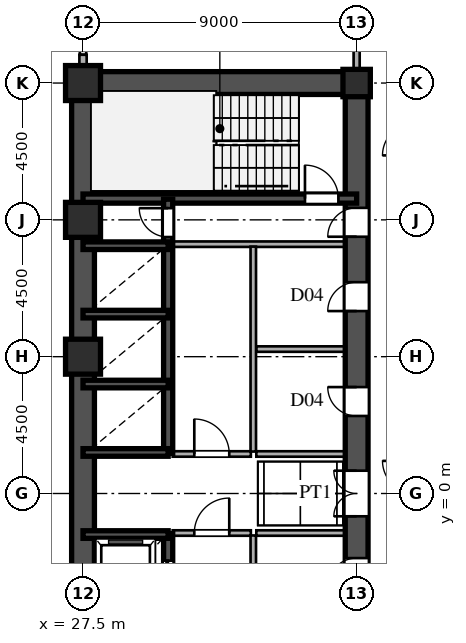
"""IFC4 building model, lengths in metres.
Left out: names, types, materials, properties, quantities, classifications, styles, units other than length and angle.
Written with IfcOpenShell. Run it as: python <this file> out.ifc"""

import sys

from ifc_helpers import new_model, si_unit, direction, frame, frame_2d, origin, origin_2d, place, context, subcontext, project, spatial, rectangle, hollow_rectangle, i_section, extrude, source, transform, mapped, element, fill, save


model = new_model("IFC4")
c1 = context("Model", 3, precision=1e-05, world=origin(), true_north=direction((0.0, 1.0)))
c2 = subcontext(c1, "Body", "Model", "MODEL_VIEW")
j1 = project(units=[si_unit("LENGTHUNIT", "METRE"), si_unit("PLANEANGLEUNIT", "RADIAN")], contexts=[c1])
p1 = place(None, origin())
s1 = spatial("IfcSite", under=j1, at=p1, CompositionType="ELEMENT")
p2 = place(p1, origin())
s2 = spatial("IfcBuilding", under=s1, at=p2, CompositionType="ELEMENT")
p3 = place(p2, frame((0.0, 0.0, 29.7)))
s3 = spatial("IfcBuildingStorey", under=s2, at=p3, CompositionType="ELEMENT", Elevation=29.7)
m1 = source(origin(), c2, "Body", "SweptSolid", [
    extrude(hollow_rectangle(XDim=1.15, YDim=1.15, WallThickness=0.048, at=origin_2d()), origin(), (0.0, 0.0, 1.0), 3.6),
])
for number, where, z_axis, x_axis in (
    (1, (27.5, 4.5, 0.0), (0.0, 0.0, 1.0), (1.0, 0.0, 0.0)),
    (2, (27.5, 9.0, 0.0), (0.0, 0.0, 1.0), (1.0, 0.0, 0.0)),
    (3, (27.5, 13.5, 0.0), (0.0, 0.0, 1.0), (1.0, 0.0, 0.0)),
):
    element("IfcColumn", number, at=place(p3, frame(where, z_axis=z_axis, x_axis=x_axis)), inside=s3, PredefinedType="COLUMN", context=c2, shape_type="MappedRepresentation", body=[
        mapped(m1, transform((0.0, 0.0, 0.0), scale=1.0)),
    ])
m2 = source(origin(), c2, "Body", "SweptSolid", [
    extrude(i_section(OverallWidth=0.9, OverallDepth=0.9, WebThickness=0.036, FlangeThickness=0.055, at=origin_2d()), origin(), (0.0, 0.0, 1.0), 3.6),
])
p4 = place(p3, frame((36.5, 13.5, 0.0), z_axis=(0.0, 0.0, 1.0), x_axis=(1.0, 0.0, 0.0)))
e4 = element("IfcColumn", 4, at=p4, inside=s3, PredefinedType="COLUMN", context=c2, shape_type="MappedRepresentation", body=[
    mapped(m2, transform((0.0, 0.0, 0.0), scale=1.0)),
])
p5 = place(p3, frame((27.5, 13.88, 0.0), z_axis=(0.0, 0.0, 1.0), x_axis=(0.0, 1.0, 0.0)))
e5 = element("IfcWall", 5, at=p5, inside=s3, PredefinedType="SOLIDWALL", context=c2, shape_type="SweptSolid", body=[
    extrude(rectangle(XDim=0.55, YDim=0.24, at=frame_2d((0.275, 0.0))), origin(), (0.0, 0.0, 1.0), 2.88),
])
for number, where, z_axis, x_axis in (
    (6, (27.5, -13.5, 0.0), (0.0, 0.0, 1.0), (0.0, 1.0, 0.0)),
    (7, (27.5, 1.3, 0.0), (0.0, 0.0, 1.0), (0.0, 1.0, 0.0)),
):
    element("IfcWall", number, at=place(p3, frame(where, z_axis=z_axis, x_axis=x_axis)), inside=s3, PredefinedType="SHEAR", context=c2, shape_type="SweptSolid", body=[
        extrude(rectangle(XDim=12.2, YDim=0.75, at=frame_2d((6.1, 0.0))), origin(), (0.0, 0.0, 1.0), 3.38),
    ])
p6 = place(p3, frame((27.5, -1.3, 0.0), z_axis=(0.0, 0.0, 1.0), x_axis=(0.0, 1.0, 0.0)))
e8 = element("IfcWall", 8, at=p6, inside=s3, PredefinedType="SHEAR", context=c2, shape_type="SweptSolid", body=[
    extrude(rectangle(XDim=2.6, YDim=0.75, at=frame_2d((1.3, 0.0))), origin(), (0.0, 0.0, 1.0), 3.38),
])
p7 = place(p3, frame((27.5, 13.5, 0.0), z_axis=(0.0, 0.0, 1.0), x_axis=(1.0, 0.0, 0.0)))
e9 = element("IfcWall", 9, at=p7, inside=s3, PredefinedType="SHEAR", context=c2, shape_type="SweptSolid", body=[
    extrude(rectangle(XDim=9.0, YDim=0.75, at=frame_2d((4.5, 0.0))), origin(), (0.0, 0.0, 1.0), 3.38),
])
p8 = place(p3, frame((36.5, -1.3, 0.0), z_axis=(0.0, 0.0, 1.0), x_axis=(0.0, 1.0, 0.0)))
e10 = element("IfcWall", 10, at=p8, inside=s3, PredefinedType="SHEAR", context=c2, shape_type="SweptSolid", body=[
    extrude(rectangle(XDim=2.6, YDim=0.75, at=frame_2d((1.3, 0.0))), origin(), (0.0, 0.0, 1.0), 3.38),
])
p9 = place(p8, frame((0.55, 0.0, 0.0)))
e11 = element("IfcOpeningElement", 11, at=p9, cuts=e10, PredefinedType="OPENING", context=c2, shape_type="SweptSolid", body=[
    extrude(rectangle(XDim=1.5, YDim=2.3, at=frame_2d((0.75, 1.15))), frame((0.0, 0.385, 0.0), z_axis=(0.0, -1.0, 0.0), x_axis=(1.0, 0.0, 0.0)), (0.0, 0.0, 1.0), 0.77),
])
p10 = place(p3, frame((36.5, 8.2, 0.0), z_axis=(0.0, 0.0, 1.0), x_axis=(0.0, 1.0, 0.0)))
e12 = element("IfcWall", 12, at=p10, inside=s3, PredefinedType="SHEAR", context=c2, shape_type="SweptSolid", body=[
    extrude(rectangle(XDim=5.45, YDim=0.75, at=frame_2d((2.725, 0.0))), origin(), (0.0, 0.0, 1.0), 3.38),
])
p11 = place(p10, frame((0.245, 0.0, 0.0)))
e13 = element("IfcOpeningElement", 13, at=p11, cuts=e12, PredefinedType="OPENING", context=c2, shape_type="SweptSolid", body=[
    extrude(rectangle(XDim=0.95, YDim=2.15, at=frame_2d((0.475, 1.075))), frame((0.0, 0.385, 0.0), z_axis=(0.0, -1.0, 0.0), x_axis=(1.0, 0.0, 0.0)), (0.0, 0.0, 1.0), 0.77),
])
p12 = place(p3, frame((36.5, -3.9, 0.0), z_axis=(0.0, 0.0, 1.0), x_axis=(0.0, 1.0, 0.0)))
e14 = element("IfcWall", 14, at=p12, inside=s3, PredefinedType="SHEAR", context=c2, shape_type="SweptSolid", body=[
    extrude(rectangle(XDim=2.6, YDim=0.75, at=frame_2d((1.3, 0.0))), origin(), (0.0, 0.0, 1.0), 3.38),
])
p13 = place(p12, frame((0.825, 0.0, 0.0)))
e15 = element("IfcOpeningElement", 15, at=p13, cuts=e14, PredefinedType="OPENING", context=c2, shape_type="SweptSolid", body=[
    extrude(rectangle(XDim=0.95, YDim=2.15, at=frame_2d((0.475, 1.075))), frame((0.0, 0.385, 0.0), z_axis=(0.0, -1.0, 0.0), x_axis=(1.0, 0.0, 0.0)), (0.0, 0.0, 1.0), 0.77),
])
p14 = place(p3, frame((36.5, 1.3, 0.0), z_axis=(0.0, 0.0, 1.0), x_axis=(0.0, 1.0, 0.0)))
e16 = element("IfcWall", 16, at=p14, inside=s3, PredefinedType="SHEAR", context=c2, shape_type="SweptSolid", body=[
    extrude(rectangle(XDim=3.45, YDim=0.75, at=frame_2d((1.725, 0.0))), origin(), (0.0, 0.0, 1.0), 3.38),
])
p15 = place(p14, frame((1.25, 0.0, 0.0)))
e17 = element("IfcOpeningElement", 17, at=p15, cuts=e16, PredefinedType="OPENING", context=c2, shape_type="SweptSolid", body=[
    extrude(rectangle(XDim=0.95, YDim=2.15, at=frame_2d((0.475, 1.075))), frame((0.0, 0.385, 0.0), z_axis=(0.0, -1.0, 0.0), x_axis=(1.0, 0.0, 0.0)), (0.0, 0.0, 1.0), 0.77),
])
p16 = place(p3, frame((36.5, 4.75, 0.0), z_axis=(0.0, 0.0, 1.0), x_axis=(0.0, 1.0, 0.0)))
e18 = element("IfcWall", 18, at=p16, inside=s3, PredefinedType="SHEAR", context=c2, shape_type="SweptSolid", body=[
    extrude(rectangle(XDim=3.45, YDim=0.75, at=frame_2d((1.725, 0.0))), origin(), (0.0, 0.0, 1.0), 3.38),
])
p17 = place(p16, frame((1.25, 0.0, 0.0)))
e19 = element("IfcOpeningElement", 19, at=p17, cuts=e18, PredefinedType="OPENING", context=c2, shape_type="SweptSolid", body=[
    extrude(rectangle(XDim=0.95, YDim=2.15, at=frame_2d((0.475, 1.075))), frame((0.0, 0.385, 0.0), z_axis=(0.0, -1.0, 0.0), x_axis=(1.0, 0.0, 0.0)), (0.0, 0.0, 1.0), 0.77),
])
p18 = place(p3, frame((27.5, 9.7, 0.0), z_axis=(0.0, 0.0, 1.0), x_axis=(1.0, 0.0, 0.0)))
e20 = element("IfcWall", 20, at=p18, inside=s3, PredefinedType="SHEAR", context=c2, shape_type="SweptSolid", body=[
    extrude(rectangle(XDim=9.0, YDim=0.3, at=frame_2d((4.5, 0.0))), origin(), (0.0, 0.0, 1.0), 3.38),
])
p19 = place(p18, frame((7.3, 0.0, 0.0)))
e21 = element("IfcOpeningElement", 21, at=p19, cuts=e20, PredefinedType="OPENING", context=c2, shape_type="SweptSolid", body=[
    extrude(rectangle(XDim=1.1, YDim=2.2, at=frame_2d((0.55, 1.1))), frame((0.0, 0.16, 0.0), z_axis=(0.0, -1.0, 0.0), x_axis=(1.0, 0.0, 0.0)), (0.0, 0.0, 1.0), 0.32),
])
for number, where, z_axis, x_axis in (
    (22, (27.5, -1.35, 0.0), (0.0, 0.0, 1.0), (1.0, 0.0, 0.0)),
    (23, (27.5, 1.35, 0.0), (0.0, 0.0, 1.0), (1.0, 0.0, 0.0)),
    (24, (27.5, 3.6, 0.0), (0.0, 0.0, 1.0), (1.0, 0.0, 0.0)),
    (25, (27.5, 5.9, 0.0), (0.0, 0.0, 1.0), (1.0, 0.0, 0.0)),
    (26, (27.5, 8.15, 0.0), (0.0, 0.0, 1.0), (1.0, 0.0, 0.0)),
):
    element("IfcWall", number, at=place(p3, frame(where, z_axis=z_axis, x_axis=x_axis)), inside=s3, PredefinedType="SHEAR", context=c2, shape_type="SweptSolid", body=[
        extrude(rectangle(XDim=2.8, YDim=0.25, at=frame_2d((1.4, 0.0))), origin(), (0.0, 0.0, 1.0), 3.38),
    ])
p20 = place(p3, frame((30.3, -4.2, 0.0), z_axis=(0.0, 0.0, 1.0), x_axis=(0.0, 1.0, 0.0)))
e27 = element("IfcWall", 27, at=p20, inside=s3, PredefinedType="SHEAR", context=c2, shape_type="SweptSolid", body=[
    extrude(rectangle(XDim=2.88, YDim=0.3, at=frame_2d((1.44, 0.0))), origin(), (0.0, 0.0, 1.0), 3.38),
])
p21 = place(p20, frame((0.89, 0.0, 0.0)))
e28 = element("IfcOpeningElement", 28, at=p21, cuts=e27, PredefinedType="OPENING", context=c2, shape_type="SweptSolid", body=[
    extrude(rectangle(XDim=1.1, YDim=2.2, at=frame_2d((0.55, 1.1))), frame((0.0, 0.16, 0.0), z_axis=(0.0, -1.0, 0.0), x_axis=(1.0, 0.0, 0.0)), (0.0, 0.0, 1.0), 0.32),
])
p22 = place(p3, frame((30.3, 1.32, 0.0), z_axis=(0.0, 0.0, 1.0), x_axis=(0.0, 1.0, 0.0)))
e29 = element("IfcWall", 29, at=p22, inside=s3, PredefinedType="SHEAR", context=c2, shape_type="SweptSolid", body=[
    extrude(rectangle(XDim=2.28, YDim=0.3, at=frame_2d((1.14, 0.0))), origin(), (0.0, 0.0, 1.0), 3.38),
])
p23 = place(p3, frame((30.3, 3.6, 0.0), z_axis=(0.0, 0.0, 1.0), x_axis=(0.0, 1.0, 0.0)))
e30 = element("IfcWall", 30, at=p23, inside=s3, PredefinedType="SHEAR", context=c2, shape_type="SweptSolid", body=[
    extrude(rectangle(XDim=2.3, YDim=0.3, at=frame_2d((1.15, 0.0))), origin(), (0.0, 0.0, 1.0), 3.38),
])
p24 = place(p3, frame((30.3, 5.9, 0.0), z_axis=(0.0, 0.0, 1.0), x_axis=(0.0, 1.0, 0.0)))
e31 = element("IfcWall", 31, at=p24, inside=s3, PredefinedType="SHEAR", context=c2, shape_type="SweptSolid", body=[
    extrude(rectangle(XDim=2.25, YDim=0.3, at=frame_2d((1.125, 0.0))), origin(), (0.0, 0.0, 1.0), 3.38),
])
p25 = place(p3, frame((30.3, 8.15, 0.0), z_axis=(0.0, 0.0, 1.0), x_axis=(0.0, 1.0, 0.0)))
e32 = element("IfcWall", 32, at=p25, inside=s3, PredefinedType="SHEAR", context=c2, shape_type="SweptSolid", body=[
    extrude(rectangle(XDim=1.53, YDim=0.3, at=frame_2d((0.765, 0.0))), origin(), (0.0, 0.0, 1.0), 3.38),
])
p26 = place(p25, frame((0.285, 0.0, 0.0)))
e33 = element("IfcOpeningElement", 33, at=p26, cuts=e32, PredefinedType="OPENING", context=c2, shape_type="SweptSolid", body=[
    extrude(rectangle(XDim=0.95, YDim=2.15, at=frame_2d((0.475, 1.075))), frame((0.0, 0.16, 0.0), z_axis=(0.0, -1.0, 0.0), x_axis=(1.0, 0.0, 0.0)), (0.0, 0.0, 1.0), 0.32),
])
p27 = place(p3, frame((30.45, 8.2, 0.0), z_axis=(0.0, 0.0, 1.0), x_axis=(1.0, 0.0, 0.0)))
e34 = element("IfcWall", 34, at=p27, inside=s3, PredefinedType="PARTITIONING", context=c2, shape_type="SweptSolid", body=[
    extrude(rectangle(XDim=5.7, YDim=0.18, at=frame_2d((2.85, 0.0))), origin(), (0.0, 0.0, 1.0), 3.38),
])
p28 = place(p3, frame((33.1, -6.42, 0.0), z_axis=(0.0, 0.0, 1.0), x_axis=(0.0, 1.0, 0.0)))
e35 = element("IfcWall", 35, at=p28, inside=s3, PredefinedType="PARTITIONING", context=c2, shape_type="SweptSolid", body=[
    extrude(rectangle(XDim=5.04, YDim=0.18, at=frame_2d((2.52, 0.0))), origin(), (0.0, 0.0, 1.0), 3.38),
])
p29 = place(p3, frame((33.1, 1.38, 0.0), z_axis=(0.0, 0.0, 1.0), x_axis=(0.0, 1.0, 0.0)))
e36 = element("IfcWall", 36, at=p29, inside=s3, PredefinedType="PARTITIONING", context=c2, shape_type="SweptSolid", body=[
    extrude(rectangle(XDim=6.74, YDim=0.18, at=frame_2d((3.37, 0.0))), origin(), (0.0, 0.0, 1.0), 3.38),
])
p30 = place(p3, frame((30.45, -1.3, 0.0), z_axis=(0.0, 0.0, 1.0), x_axis=(1.0, 0.0, 0.0)))
e37 = element("IfcWall", 37, at=p30, inside=s3, PredefinedType="PARTITIONING", context=c2, shape_type="SweptSolid", body=[
    extrude(rectangle(XDim=2.57, YDim=0.18, at=frame_2d((1.285, 0.0))), origin(), (0.0, 0.0, 1.0), 3.38),
])
p31 = place(p30, frame((0.71, 0.0, 0.0)))
e38 = element("IfcOpeningElement", 38, at=p31, cuts=e37, PredefinedType="OPENING", context=c2, shape_type="SweptSolid", body=[
    extrude(rectangle(XDim=1.15, YDim=2.2, at=frame_2d((0.575, 1.1))), frame((0.0, 0.1, 0.0), z_axis=(0.0, -1.0, 0.0), x_axis=(1.0, 0.0, 0.0)), (0.0, 0.0, 1.0), 0.2),
])
p32 = place(p3, frame((30.45, 1.3, 0.0), z_axis=(0.0, 0.0, 1.0), x_axis=(1.0, 0.0, 0.0)))
e39 = element("IfcWall", 39, at=p32, inside=s3, PredefinedType="PARTITIONING", context=c2, shape_type="SweptSolid", body=[
    extrude(rectangle(XDim=2.57, YDim=0.18, at=frame_2d((1.285, 0.0))), origin(), (0.0, 0.0, 1.0), 3.38),
])
p33 = place(p32, frame((0.71, 0.0, 0.0)))
e40 = element("IfcOpeningElement", 40, at=p33, cuts=e39, PredefinedType="OPENING", context=c2, shape_type="SweptSolid", body=[
    extrude(rectangle(XDim=1.15, YDim=2.2, at=frame_2d((0.575, 1.1))), frame((0.0, 0.1, 0.0), z_axis=(0.0, -1.0, 0.0), x_axis=(1.0, 0.0, 0.0)), (0.0, 0.0, 1.0), 0.2),
])
for number, where, z_axis, x_axis in (
    (41, (33.2, -1.3, 0.0), (0.0, 0.0, 1.0), (1.0, 0.0, 0.0)),
    (42, (33.2, 1.3, 0.0), (0.0, 0.0, 1.0), (1.0, 0.0, 0.0)),
    (43, (33.2, 4.75, 0.0), (0.0, 0.0, 1.0), (1.0, 0.0, 0.0)),
):
    element("IfcWall", number, at=place(p3, frame(where, z_axis=z_axis, x_axis=x_axis)), inside=s3, PredefinedType="PARTITIONING", context=c2, shape_type="SweptSolid", body=[
        extrude(rectangle(XDim=2.95, YDim=0.18, at=frame_2d((1.475, 0.0))), origin(), (0.0, 0.0, 1.0), 3.38),
    ])
p34 = place(p3, frame((36.5, 13.88, 0.0), z_axis=(0.0, 0.0, 1.0), x_axis=(0.0, 1.0, 0.0)))
e44 = element("IfcWall", 44, at=p34, inside=s3, PredefinedType="PARTITIONING", context=c2, shape_type="SweptSolid", body=[
    extrude(rectangle(XDim=1.635, YDim=0.2, at=frame_2d((0.817, 0.0))), origin(), (0.0, 0.0, 1.0), 2.68),
])
m3 = source(origin(), c2, "Body", "SweptSolid", [
    extrude(rectangle(XDim=1.5, YDim=2.3, at=frame_2d((0.75, 1.15))), frame((0.0, 0.025, 0.0), z_axis=(0.0, -1.0, 0.0), x_axis=(1.0, 0.0, 0.0)), (0.0, 0.0, 1.0), 0.05),
])
p35 = place(p9, origin())
e45 = element("IfcDoor", 45, at=p35, inside=s3, OperationType="DOUBLE_SWING_LEFT", PredefinedType="DOOR", context=c2, shape_type="MappedRepresentation", body=[
    mapped(m3, transform((0.0, 0.0, 0.0), scale=1.0)),
])
fill(e11, e45)
m4 = source(origin(), c2, "Body", "SweptSolid", [
    extrude(rectangle(XDim=0.95, YDim=2.15, at=frame_2d((0.475, 1.075))), frame((0.0, 0.025, 0.0), z_axis=(0.0, -1.0, 0.0), x_axis=(1.0, 0.0, 0.0)), (0.0, 0.0, 1.0), 0.05),
])
p36 = place(p11, origin())
e46 = element("IfcDoor", 46, at=p36, inside=s3, OperationType="SINGLE_SWING_LEFT", PredefinedType="DOOR", context=c2, shape_type="MappedRepresentation", body=[
    mapped(m4, transform((0.0, 0.0, 0.0), scale=1.0)),
])
fill(e13, e46)
p37 = place(p13, origin())
e47 = element("IfcDoor", 47, at=p37, inside=s3, OperationType="SINGLE_SWING_LEFT", PredefinedType="DOOR", context=c2, shape_type="MappedRepresentation", body=[
    mapped(m4, transform((0.0, 0.0, 0.0), scale=1.0)),
])
fill(e15, e47)
p38 = place(p15, origin())
e48 = element("IfcDoor", 48, at=p38, inside=s3, OperationType="SINGLE_SWING_RIGHT", PredefinedType="DOOR", context=c2, shape_type="MappedRepresentation", body=[
    mapped(m4, transform((0.0, 0.0, 0.0), scale=1.0)),
])
fill(e17, e48)
p39 = place(p17, origin())
e49 = element("IfcDoor", 49, at=p39, inside=s3, OperationType="SINGLE_SWING_LEFT", PredefinedType="DOOR", context=c2, shape_type="MappedRepresentation", body=[
    mapped(m4, transform((0.0, 0.0, 0.0), scale=1.0)),
])
fill(e19, e49)
m5 = source(origin(), c2, "Body", "SweptSolid", [
    extrude(rectangle(XDim=1.1, YDim=2.2, at=frame_2d((0.55, 1.1))), frame((0.0, 0.025, 0.0), z_axis=(0.0, -1.0, 0.0), x_axis=(1.0, 0.0, 0.0)), (0.0, 0.0, 1.0), 0.05),
])
p40 = place(p19, origin())
e50 = element("IfcDoor", 50, at=p40, inside=s3, OperationType="SINGLE_SWING_LEFT", PredefinedType="DOOR", context=c2, shape_type="MappedRepresentation", body=[
    mapped(m5, transform((0.0, 0.0, 0.0), scale=1.0)),
])
fill(e21, e50)
m6 = source(origin(), c2, "Body", "SweptSolid", [
    extrude(rectangle(XDim=1.1, YDim=2.2, at=frame_2d((0.55, 1.1))), frame((0.0, 0.025, 0.0), z_axis=(0.0, -1.0, 0.0), x_axis=(1.0, 0.0, 0.0)), (0.0, 0.0, 1.0), 0.05),
])
p41 = place(p21, origin())
e51 = element("IfcDoor", 51, at=p41, inside=s3, OperationType="DOUBLE_DOOR_SLIDING", PredefinedType="DOOR", context=c2, shape_type="MappedRepresentation", body=[
    mapped(m6, transform((0.0, 0.0, 0.0), scale=1.0)),
])
fill(e28, e51)
p42 = place(p26, origin())
e52 = element("IfcDoor", 52, at=p42, inside=s3, OperationType="SINGLE_SWING_RIGHT", PredefinedType="DOOR", context=c2, shape_type="MappedRepresentation", body=[
    mapped(m4, transform((0.0, 0.0, 0.0), scale=1.0)),
])
fill(e33, e52)
m7 = source(origin(), c2, "Body", "SweptSolid", [
    extrude(rectangle(XDim=1.15, YDim=2.2, at=frame_2d((0.575, 1.1))), frame((0.0, 0.025, 0.0), z_axis=(0.0, -1.0, 0.0), x_axis=(1.0, 0.0, 0.0)), (0.0, 0.0, 1.0), 0.05),
])
p43 = place(p31, origin())
e53 = element("IfcDoor", 53, at=p43, inside=s3, OperationType="SINGLE_SWING_RIGHT", PredefinedType="DOOR", context=c2, shape_type="MappedRepresentation", body=[
    mapped(m7, transform((0.0, 0.0, 0.0), scale=1.0)),
])
fill(e38, e53)
p44 = place(p33, origin())
e54 = element("IfcDoor", 54, at=p44, inside=s3, OperationType="SINGLE_SWING_LEFT", PredefinedType="DOOR", context=c2, shape_type="MappedRepresentation", body=[
    mapped(m7, transform((0.0, 0.0, 0.0), scale=1.0)),
])
fill(e40, e54)
save(model, sys.argv[1])
